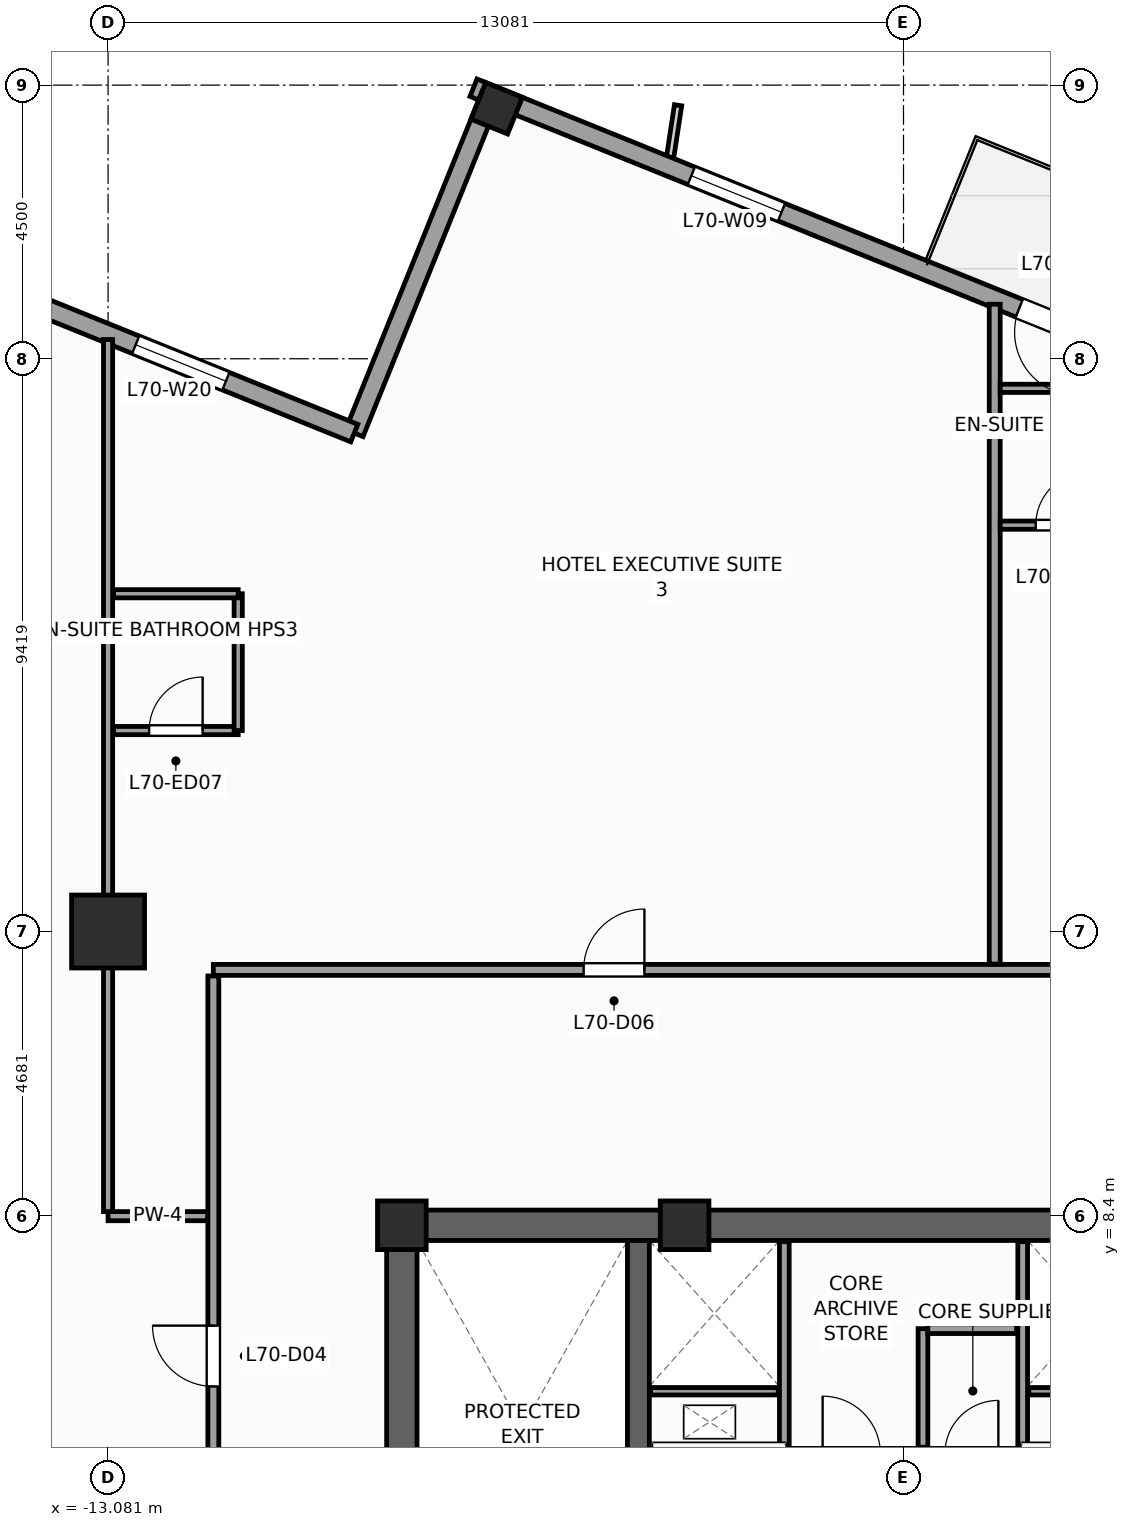
"""IFC4 building model, lengths in metres.
Left out: names, types, materials, properties, quantities, classifications, styles, units other than length and angle.
Written with IfcOpenShell. Run it as: python <this file> out.ifc"""

import sys

from ifc_helpers import new_model, si_unit, direction, frame, frame_2d, origin, origin_2d, place, context, subcontext, project, spatial, rectangle, extrude, source, transform, mapped, element, fill, save


model = new_model("IFC4")
c1 = context("Model", 3, precision=1e-05, world=origin(), true_north=direction((0.0, 1.0)))
c2 = subcontext(c1, "Body", "Model", "MODEL_VIEW")
j1 = project(units=[si_unit("LENGTHUNIT", "METRE"), si_unit("PLANEANGLEUNIT", "RADIAN")], contexts=[c1])
p1 = place(None, origin())
s1 = spatial("IfcSite", under=j1, at=p1, CompositionType="ELEMENT")
p2 = place(p1, origin())
s2 = spatial("IfcBuilding", under=s1, at=p2, CompositionType="ELEMENT")
p3 = place(p2, frame((0.0, 0.0, 286.8)))
s3 = spatial("IfcBuildingStorey", under=s2, at=p3, CompositionType="ELEMENT", Elevation=286.8)
p4 = place(p3, frame((-8.5, 8.25, 0.0), z_axis=(0.0, 0.0, 1.0), x_axis=(1.0, 0.0, 0.0)))
e1 = element("IfcWall", 1, at=p4, inside=s3, PredefinedType="SHEAR", context=c2, shape_type="SweptSolid", body=[
    extrude(rectangle(XDim=17.0, YDim=0.5, at=frame_2d((8.5, 0.0))), origin(), (0.0, 0.0, 1.0), 3.6),
])
p5 = place(p3, frame((-8.25, -8.0, 0.0), z_axis=(0.0, 0.0, 1.0), x_axis=(0.0, 1.0, 0.0)))
e2 = element("IfcWall", 2, at=p5, inside=s3, PredefinedType="SHEAR", context=c2, shape_type="SweptSolid", body=[
    extrude(rectangle(XDim=16.0, YDim=0.5, at=frame_2d((8.0, 0.0))), origin(), (0.0, 0.0, 1.0), 3.6),
])
p6 = place(p5, frame((4.69, 0.0, 0.0)))
e3 = element("IfcOpeningElement", 3, at=p6, cuts=e2, PredefinedType="OPENING", context=c2, shape_type="SweptSolid", body=[
    extrude(rectangle(XDim=1.3, YDim=2.2, at=frame_2d((0.65, 1.1))), frame((0.0, 0.26, 0.0), z_axis=(0.0, -1.0, 0.0), x_axis=(1.0, 0.0, 0.0)), (0.0, 0.0, 1.0), 0.52),
])
p7 = place(p3, frame((-4.36, -8.0, 0.0), z_axis=(0.0, 0.0, 1.0), x_axis=(0.0, 1.0, 0.0)))
e4 = element("IfcWall", 4, at=p7, inside=s3, PredefinedType="SHEAR", context=c2, shape_type="SweptSolid", body=[
    extrude(rectangle(XDim=16.0, YDim=0.36, at=frame_2d((8.0, 0.0))), origin(), (0.0, 0.0, 1.0), 3.6),
])
m1 = source(origin(), c2, "Body", "SweptSolid", [
    extrude(rectangle(XDim=0.8, YDim=0.8, at=origin_2d()), origin(), (0.0, 0.0, 1.0), 3.6),
])
for number, where, z_axis, x_axis in (
    (5, (-8.25, 8.25, 0.0), (0.0, 0.0, 1.0), (1.0, 0.0, 0.0)),
    (6, (-3.6, 8.25, 0.0), (0.0, 0.0, 1.0), (1.0, 0.0, 0.0)),
):
    element("IfcColumn", number, at=place(p3, frame(where, z_axis=z_axis, x_axis=x_axis)), inside=s3, PredefinedType="PILASTER", context=c2, shape_type="MappedRepresentation", body=[
        mapped(m1, transform((0.0, 0.0, 0.0), scale=1.0)),
    ])
m2 = source(origin(), c2, "Body", "SweptSolid", [
    extrude(rectangle(XDim=1.2, YDim=1.2, at=origin_2d()), origin(), (0.0, 0.0, 1.0), 3.6),
])
p8 = place(p3, frame((-13.081, 13.081, 0.0), z_axis=(0.0, 0.0, 1.0), x_axis=(1.0, 0.0, 0.0)))
e7 = element("IfcColumn", 7, at=p8, inside=s3, PredefinedType="COLUMN", context=c2, shape_type="MappedRepresentation", body=[
    mapped(m2, transform((0.0, 0.0, 0.0), scale=1.0)),
])
m3 = source(origin(), c2, "Body", "SweptSolid", [
    extrude(rectangle(XDim=0.65, YDim=0.65, at=origin_2d()), origin(), (0.0, 0.0, 1.0), 3.6),
])
p9 = place(p3, frame((-6.69, 26.62, 0.0), z_axis=(0.0, 0.0, 1.0), x_axis=(0.374606593416, 0.927183854567, 0.0)))
e8 = element("IfcColumn", 8, at=p9, inside=s3, PredefinedType="COLUMN", context=c2, shape_type="MappedRepresentation", body=[
    mapped(m3, transform((0.0, 0.0, 0.0), scale=1.0)),
])
p10 = place(p3, frame((23.813, 14.479, 0.0), z_axis=(0.0, 0.0, 1.0), x_axis=(-0.927182657188, 0.374609557019, 0.0)))
e9 = element("IfcWall", 9, at=p10, inside=s3, PredefinedType="STANDARD", context=c2, shape_type="SweptSolid", body=[
    extrude(rectangle(XDim=33.31, YDim=0.31, at=frame_2d((16.655, 0.0))), origin(), (0.0, 0.0, 1.0), 2.75),
])
p11 = place(p10, frame((22.58, 0.0, 0.0)))
e10 = element("IfcOpeningElement", 10, at=p11, cuts=e9, PredefinedType="OPENING", context=c2, shape_type="SweptSolid", body=[
    extrude(rectangle(XDim=1.05, YDim=2.25, at=frame_2d((0.525, 1.125))), frame((0.0, 0.165, 0.0), z_axis=(0.0, -1.0, 0.0), x_axis=(1.0, 0.0, 0.0)), (0.0, 0.0, 1.0), 0.33),
])
p12 = place(p10, frame((3.197, 0.0, 0.47)))
e11 = element("IfcOpeningElement", 11, at=p12, cuts=e9, PredefinedType="OPENING", context=c2, shape_type="SweptSolid", body=[
    extrude(rectangle(XDim=1.6, YDim=2.1, at=frame_2d((0.8, 1.05))), frame((0.0, 0.165, 0.0), z_axis=(0.0, -1.0, 0.0), x_axis=(1.0, 0.0, 0.0)), (0.0, 0.0, 1.0), 0.33),
])
p13 = place(p10, frame((8.86, 0.0, 0.47)))
e12 = element("IfcOpeningElement", 12, at=p13, cuts=e9, PredefinedType="OPENING", context=c2, shape_type="SweptSolid", body=[
    extrude(rectangle(XDim=1.6, YDim=2.1, at=frame_2d((0.8, 1.05))), frame((0.0, 0.165, 0.0), z_axis=(0.0, -1.0, 0.0), x_axis=(1.0, 0.0, 0.0)), (0.0, 0.0, 1.0), 0.33),
])
p14 = place(p10, frame((14.439, 0.0, 0.47)))
e13 = element("IfcOpeningElement", 13, at=p14, cuts=e9, PredefinedType="OPENING", context=c2, shape_type="SweptSolid", body=[
    extrude(rectangle(XDim=1.6, YDim=2.1, at=frame_2d((0.8, 1.05))), frame((0.0, 0.165, 0.0), z_axis=(0.0, -1.0, 0.0), x_axis=(1.0, 0.0, 0.0)), (0.0, 0.0, 1.0), 0.33),
])
p15 = place(p10, frame((27.847, 0.0, 0.47)))
e14 = element("IfcOpeningElement", 14, at=p15, cuts=e9, PredefinedType="OPENING", context=c2, shape_type="SweptSolid", body=[
    extrude(rectangle(XDim=1.6, YDim=2.1, at=frame_2d((0.8, 1.05))), frame((0.0, 0.165, 0.0), z_axis=(0.0, -1.0, 0.0), x_axis=(1.0, 0.0, 0.0)), (0.0, 0.0, 1.0), 0.33),
])
p16 = place(p3, frame((-6.784, 26.841, 0.0), z_axis=(0.0, 0.0, 1.0), x_axis=(-0.374636620962, -0.927171722085, 0.0)))
e15 = element("IfcWall", 15, at=p16, inside=s3, PredefinedType="STANDARD", context=c2, shape_type="SweptSolid", body=[
    extrude(rectangle(XDim=6.0, YDim=0.31, at=frame_2d((3.0, 0.0))), origin(), (0.0, 0.0, 1.0), 2.65),
])
p17 = place(p3, frame((-9.032, 21.278, 0.0), z_axis=(0.0, 0.0, 1.0), x_axis=(-0.927185411764, 0.374602739196, 0.0)))
e16 = element("IfcWall", 16, at=p17, inside=s3, PredefinedType="STANDARD", context=c2, shape_type="SweptSolid", body=[
    extrude(rectangle(XDim=6.155, YDim=0.31, at=frame_2d((3.078, 0.0))), origin(), (0.0, 0.0, 1.0), 3.35),
])
p18 = place(p17, frame((2.278, 0.0, 0.47)))
e17 = element("IfcOpeningElement", 17, at=p18, cuts=e16, PredefinedType="OPENING", context=c2, shape_type="SweptSolid", body=[
    extrude(rectangle(XDim=1.6, YDim=2.1, at=frame_2d((0.8, 1.05))), frame((0.0, 0.165, 0.0), z_axis=(0.0, -1.0, 0.0), x_axis=(1.0, 0.0, 0.0)), (0.0, 0.0, 1.0), 0.33),
])
for number, where, z_axis, x_axis in (
    (18, (-1.96, 4.58, 0.0), (0.0, 0.0, 1.0), (0.0, 1.0, 0.0)),
    (19, (1.96, 4.58, 0.0), (0.0, 0.0, 1.0), (0.0, 1.0, 0.0)),
):
    element("IfcWall", number, at=place(p3, frame(where, z_axis=z_axis, x_axis=x_axis)), inside=s3, PredefinedType="PARTITIONING", context=c2, shape_type="SweptSolid", body=[
        extrude(rectangle(XDim=3.4, YDim=0.16, at=frame_2d((1.7, 0.0))), origin(), (0.0, 0.0, 1.0), 3.35),
    ])
for number, where, z_axis, x_axis in (
    (20, (-4.16, 5.52, 0.0), (0.0, 0.0, 1.0), (1.0, 0.0, 0.0)),
    (21, (2.06, 5.52, 0.0), (0.0, 0.0, 1.0), (1.0, 0.0, 0.0)),
):
    element("IfcWall", number, at=place(p3, frame(where, z_axis=z_axis, x_axis=x_axis)), inside=s3, PredefinedType="PARTITIONING", context=c2, shape_type="SweptSolid", body=[
        extrude(rectangle(XDim=2.1, YDim=0.12, at=frame_2d((1.05, 0.0))), origin(), (0.0, 0.0, 1.0), 3.35),
    ])
p19 = place(p3, frame((0.32, 4.6, 0.0), z_axis=(0.0, 0.0, 1.0), x_axis=(0.0, 1.0, 0.0)))
e22 = element("IfcWall", 22, at=p19, inside=s3, PredefinedType="PARTITIONING", context=c2, shape_type="SweptSolid", body=[
    extrude(rectangle(XDim=1.95, YDim=0.16, at=frame_2d((0.975, 0.0))), origin(), (0.0, 0.0, 1.0), 3.35),
])
p20 = place(p3, frame((0.4, 6.55, 0.0), z_axis=(0.0, 0.0, 1.0), x_axis=(1.0, 0.0, 0.0)))
e23 = element("IfcWall", 23, at=p20, inside=s3, PredefinedType="PARTITIONING", context=c2, shape_type="SweptSolid", body=[
    extrude(rectangle(XDim=1.46, YDim=0.16, at=frame_2d((0.73, 0.0))), origin(), (0.0, 0.0, 1.0), 3.35),
])
p21 = place(p3, frame((-11.35, 12.45, 0.0), z_axis=(0.0, 0.0, 1.0), x_axis=(1.0, 0.0, 0.0)))
e24 = element("IfcWall", 24, at=p21, inside=s3, PredefinedType="PARTITIONING", context=c2, shape_type="SweptSolid", body=[
    extrude(rectangle(XDim=22.8, YDim=0.18, at=frame_2d((11.4, 0.0))), origin(), (0.0, 0.0, 1.0), 3.35),
])
p22 = place(p21, frame((6.089, 0.0, 0.0)))
e25 = element("IfcOpeningElement", 25, at=p22, cuts=e24, PredefinedType="OPENING", context=c2, shape_type="SweptSolid", body=[
    extrude(rectangle(XDim=1.0, YDim=2.15, at=frame_2d((0.5, 1.075))), frame((0.0, 0.1, 0.0), z_axis=(0.0, -1.0, 0.0), x_axis=(1.0, 0.0, 0.0)), (0.0, 0.0, 1.0), 0.2),
])
p23 = place(p21, frame((17.161, 0.0, 0.0)))
e26 = element("IfcOpeningElement", 26, at=p23, cuts=e24, PredefinedType="OPENING", context=c2, shape_type="SweptSolid", body=[
    extrude(rectangle(XDim=1.0, YDim=2.15, at=frame_2d((0.5, 1.075))), frame((0.0, 0.1, 0.0), z_axis=(0.0, -1.0, 0.0), x_axis=(1.0, 0.0, 0.0)), (0.0, 0.0, 1.0), 0.2),
])
p24 = place(p3, frame((-11.35, -10.2, 0.0), z_axis=(0.0, 0.0, 1.0), x_axis=(0.0, 1.0, 0.0)))
e27 = element("IfcWall", 27, at=p24, inside=s3, PredefinedType="PARTITIONING", context=c2, shape_type="SweptSolid", body=[
    extrude(rectangle(XDim=22.55, YDim=0.18, at=frame_2d((11.275, 0.0))), origin(), (0.0, 0.0, 1.0), 3.35),
])
p25 = place(p24, frame((11.6, 0.0, 0.0)))
e28 = element("IfcOpeningElement", 28, at=p25, cuts=e27, PredefinedType="OPENING", context=c2, shape_type="SweptSolid", body=[
    extrude(rectangle(XDim=1.0, YDim=2.15, at=frame_2d((0.5, 1.075))), frame((0.0, 0.1, 0.0), z_axis=(0.0, -1.0, 0.0), x_axis=(1.0, 0.0, 0.0)), (0.0, 0.0, 1.0), 0.2),
])
p26 = place(p24, frame((15.8, 0.0, 0.0)))
e29 = element("IfcOpeningElement", 29, at=p26, cuts=e27, PredefinedType="OPENING", context=c2, shape_type="SweptSolid", body=[
    extrude(rectangle(XDim=1.0, YDim=2.15, at=frame_2d((0.5, 1.075))), frame((0.0, 0.1, 0.0), z_axis=(0.0, -1.0, 0.0), x_axis=(1.0, 0.0, 0.0)), (0.0, 0.0, 1.0), 0.2),
])
p27 = place(p24, frame((3.6, 0.0, 0.0)))
e30 = element("IfcOpeningElement", 30, at=p27, cuts=e27, PredefinedType="OPENING", context=c2, shape_type="SweptSolid", body=[
    extrude(rectangle(XDim=1.0, YDim=2.15, at=frame_2d((0.5, 1.075))), frame((0.0, 0.1, 0.0), z_axis=(0.0, -1.0, 0.0), x_axis=(1.0, 0.0, 0.0)), (0.0, 0.0, 1.0), 0.2),
])
p28 = place(p24, frame((7.8, 0.0, 0.0)))
e31 = element("IfcOpeningElement", 31, at=p28, cuts=e27, PredefinedType="OPENING", context=c2, shape_type="SweptSolid", body=[
    extrude(rectangle(XDim=1.0, YDim=2.15, at=frame_2d((0.5, 1.075))), frame((0.0, 0.1, 0.0), z_axis=(0.0, -1.0, 0.0), x_axis=(1.0, 0.0, 0.0)), (0.0, 0.0, 1.0), 0.2),
])
p29 = place(p3, frame((1.5, 12.545, 0.0), z_axis=(0.0, 0.0, 1.0), x_axis=(0.0, 1.0, 0.0)))
e32 = element("IfcWall", 32, at=p29, inside=s3, PredefinedType="PARTITIONING", context=c2, shape_type="SweptSolid", body=[
    extrude(rectangle(XDim=10.852, YDim=0.18, at=frame_2d((5.426, 0.0))), origin(), (0.0, 0.0, 1.0), 3.35),
])
p30 = place(p3, frame((-11.445, 8.4, 0.0), z_axis=(0.0, 0.0, 1.0), x_axis=(-1.0, 0.0, 0.0)))
e33 = element("IfcWall", 33, at=p30, inside=s3, PredefinedType="PARTITIONING", context=c2, shape_type="SweptSolid", body=[
    extrude(rectangle(XDim=1.636, YDim=0.15, at=frame_2d((0.818, 0.0))), origin(), (0.0, 0.0, 1.0), 3.35),
])
p31 = place(p3, frame((-13.081, 8.475, 0.0), z_axis=(0.0, 0.0, 1.0), x_axis=(0.0, 1.0, 0.0)))
e34 = element("IfcWall", 34, at=p31, inside=s3, PredefinedType="PARTITIONING", context=c2, shape_type="SweptSolid", body=[
    extrude(rectangle(XDim=14.342, YDim=0.15, at=frame_2d((7.171, 0.0))), origin(), (0.0, 0.0, 1.0), 2.45),
])
p32 = place(p3, frame((-12.991, 16.386, 0.0), z_axis=(0.0, 0.0, 1.0), x_axis=(1.0, 0.0, 0.0)))
e35 = element("IfcWall", 35, at=p32, inside=s3, PredefinedType="PARTITIONING", context=c2, shape_type="SweptSolid", body=[
    extrude(rectangle(XDim=2.05, YDim=0.135, at=frame_2d((1.025, 0.0))), origin(), (0.0, 0.0, 1.0), 3.35),
])
p33 = place(p32, frame((0.585, 0.0, 0.0)))
e36 = element("IfcOpeningElement", 36, at=p33, cuts=e35, PredefinedType="OPENING", context=c2, shape_type="SweptSolid", body=[
    extrude(rectangle(XDim=0.88, YDim=2.1, at=frame_2d((0.44, 1.05))), frame((0.0, 0.078, 0.0), z_axis=(0.0, -1.0, 0.0), x_axis=(1.0, 0.0, 0.0)), (0.0, 0.0, 1.0), 0.155),
])
p34 = place(p3, frame((-10.941, 16.386, 0.0), z_axis=(0.0, 0.0, 1.0), x_axis=(0.0, 1.0, 0.0)))
e37 = element("IfcWall", 37, at=p34, inside=s3, PredefinedType="PARTITIONING", context=c2, shape_type="SweptSolid", body=[
    extrude(rectangle(XDim=2.25, YDim=0.135, at=frame_2d((1.125, 0.0))), origin(), (0.0, 0.0, 1.0), 3.35),
])
p35 = place(p3, frame((-12.991, 18.636, 0.0), z_axis=(0.0, 0.0, 1.0), x_axis=(1.0, 0.0, 0.0)))
e38 = element("IfcWall", 38, at=p35, inside=s3, PredefinedType="PARTITIONING", context=c2, shape_type="SweptSolid", body=[
    extrude(rectangle(XDim=2.05, YDim=0.135, at=frame_2d((1.025, 0.0))), origin(), (0.0, 0.0, 1.0), 3.35),
])
p36 = place(p3, frame((1.59, 19.763, 0.0), z_axis=(0.0, 0.0, 1.0), x_axis=(1.0, 0.0, 0.0)))
e39 = element("IfcWall", 39, at=p36, inside=s3, PredefinedType="PARTITIONING", context=c2, shape_type="SweptSolid", body=[
    extrude(rectangle(XDim=2.05, YDim=0.135, at=frame_2d((1.025, 0.0))), origin(), (0.0, 0.0, 1.0), 3.35),
])
p37 = place(p36, frame((0.585, 0.0, 0.0)))
e40 = element("IfcOpeningElement", 40, at=p37, cuts=e39, PredefinedType="OPENING", context=c2, shape_type="SweptSolid", body=[
    extrude(rectangle(XDim=0.88, YDim=2.1, at=frame_2d((0.44, 1.05))), frame((0.0, 0.078, 0.0), z_axis=(0.0, -1.0, 0.0), x_axis=(1.0, 0.0, 0.0)), (0.0, 0.0, 1.0), 0.155),
])
p38 = place(p3, frame((1.59, 22.013, 0.0), z_axis=(0.0, 0.0, 1.0), x_axis=(1.0, 0.0, 0.0)))
e41 = element("IfcWall", 41, at=p38, inside=s3, PredefinedType="PARTITIONING", context=c2, shape_type="SweptSolid", body=[
    extrude(rectangle(XDim=2.05, YDim=0.135, at=frame_2d((1.025, 0.0))), origin(), (0.0, 0.0, 1.0), 3.35),
])
m4 = source(origin(), c2, "Body", "SweptSolid", [
    extrude(rectangle(XDim=1.05, YDim=2.25, at=frame_2d((0.525, 1.125))), frame((0.0, 0.025, 0.0), z_axis=(0.0, -1.0, 0.0), x_axis=(1.0, 0.0, 0.0)), (0.0, 0.0, 1.0), 0.05),
])
p39 = place(p11, origin())
e42 = element("IfcDoor", 42, at=p39, inside=s3, OperationType="SINGLE_SWING_LEFT", PredefinedType="DOOR", context=c2, shape_type="MappedRepresentation", body=[
    mapped(m4, transform((0.0, 0.0, 0.0), scale=1.0)),
])
fill(e10, e42)
m5 = source(origin(), c2, "Body", "SweptSolid", [
    extrude(rectangle(XDim=1.6, YDim=2.1, at=frame_2d((0.8, 1.05))), frame((0.0, 0.03, 0.0), z_axis=(0.0, -1.0, 0.0), x_axis=(1.0, 0.0, 0.0)), (0.0, 0.0, 1.0), 0.06),
])
p40 = place(p15, origin())
e43 = element("IfcWindow", 43, at=p40, inside=s3, PartitioningType="SINGLE_PANEL", PredefinedType="WINDOW", context=c2, shape_type="MappedRepresentation", body=[
    mapped(m5, transform((0.0, 0.0, 0.0), scale=1.0)),
])
fill(e14, e43)
p41 = place(p18, origin())
e44 = element("IfcWindow", 44, at=p41, inside=s3, PartitioningType="SINGLE_PANEL", PredefinedType="WINDOW", context=c2, shape_type="MappedRepresentation", body=[
    mapped(m5, transform((0.0, 0.0, 0.0), scale=1.0)),
])
fill(e17, e44)
m6 = source(origin(), c2, "Body", "SweptSolid", [
    extrude(rectangle(XDim=1.0, YDim=2.15, at=frame_2d((0.5, 1.075))), frame((0.0, 0.025, 0.0), z_axis=(0.0, -1.0, 0.0), x_axis=(1.0, 0.0, 0.0)), (0.0, 0.0, 1.0), 0.05),
])
p42 = place(p26, origin())
e45 = element("IfcDoor", 45, at=p42, inside=s3, OperationType="SINGLE_SWING_RIGHT", PredefinedType="DOOR", context=c2, shape_type="MappedRepresentation", body=[
    mapped(m6, transform((0.0, 0.0, 0.0), scale=1.0)),
])
fill(e29, e45)
p43 = place(p22, origin())
e46 = element("IfcDoor", 46, at=p43, inside=s3, OperationType="SINGLE_SWING_RIGHT", PredefinedType="DOOR", context=c2, shape_type="MappedRepresentation", body=[
    mapped(m6, transform((0.0, 0.0, 0.0), scale=1.0)),
])
fill(e25, e46)
m7 = source(origin(), c2, "Body", "SweptSolid", [
    extrude(rectangle(XDim=0.88, YDim=2.1, at=frame_2d((0.44, 1.05))), frame((0.0, 0.025, 0.0), z_axis=(0.0, -1.0, 0.0), x_axis=(1.0, 0.0, 0.0)), (0.0, 0.0, 1.0), 0.05),
])
p44 = place(p33, origin())
e47 = element("IfcDoor", 47, at=p44, inside=s3, OperationType="SINGLE_SWING_RIGHT", PredefinedType="DOOR", context=c2, shape_type="MappedRepresentation", body=[
    mapped(m7, transform((0.0, 0.0, 0.0), scale=1.0)),
])
fill(e36, e47)
p45 = place(p37, origin())
e48 = element("IfcDoor", 48, at=p45, inside=s3, OperationType="SINGLE_SWING_RIGHT", PredefinedType="DOOR", context=c2, shape_type="MappedRepresentation", body=[
    mapped(m7, transform((0.0, 0.0, 0.0), scale=1.0)),
])
fill(e40, e48)
save(model, sys.argv[1])
